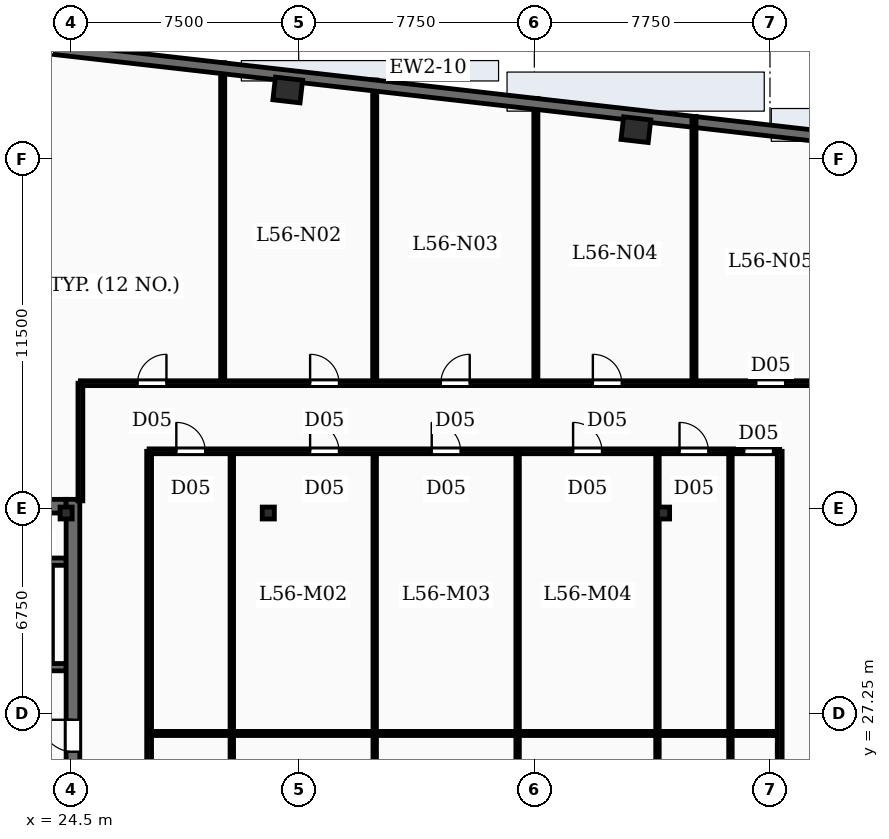
"""IFC4 building model, lengths in metres.
Left out: names, types, materials, properties, quantities, classifications, styles, units other than length and angle.
Written with IfcOpenShell. Run it as: python <this file> out.ifc"""

import sys

from ifc_helpers import new_model, si_unit, direction, frame, frame_2d, origin, origin_2d, place, context, subcontext, project, spatial, rectangle, i_section, extrude, element, fill, save


model = new_model("IFC4")
c1 = context("Model", 3, precision=1e-05, world=origin(), true_north=direction((0.0, 1.0)))
c2 = subcontext(c1, "Body", "Model", "MODEL_VIEW")
j1 = project(units=[si_unit("LENGTHUNIT", "METRE"), si_unit("PLANEANGLEUNIT", "RADIAN")], contexts=[c1])
p1 = place(None, origin())
s1 = spatial("IfcSite", under=j1, at=p1, CompositionType="ELEMENT")
p2 = place(p1, origin())
s2 = spatial("IfcBuilding", under=s1, at=p2, CompositionType="ELEMENT")
p3 = place(p2, frame((0.0, 0.0, 232.2)))
s3 = spatial("IfcBuildingStorey", under=s2, at=p3, CompositionType="ELEMENT", Elevation=232.2)
p4 = place(p3, frame((24.575, 19.0, -0.27), z_axis=(0.0, 0.0, 1.0), x_axis=(0.0, 1.0, 0.0)))
e1 = element("IfcWall", 1, at=p4, inside=s3, PredefinedType="SHEAR", context=c2, shape_type="SweptSolid", body=[
    extrude(rectangle(XDim=15.3, YDim=0.45, at=frame_2d((7.65, 0.0))), origin(), (0.0, 0.0, 1.0), 3.75),
])
p5 = place(p4, frame((2.5, 0.0, 0.27)))
e2 = element("IfcOpeningElement", 2, at=p5, cuts=e1, PredefinedType="OPENING", context=c2, shape_type="SweptSolid", body=[
    extrude(rectangle(XDim=1.05, YDim=2.15, at=frame_2d((0.525, 1.075))), frame((0.0, 0.235, 0.0), z_axis=(0.0, -1.0, 0.0), x_axis=(1.0, 0.0, 0.0)), (0.0, 0.0, 1.0), 0.47),
])
p6 = place(p4, frame((7.0, 0.0, 0.27)))
e3 = element("IfcOpeningElement", 3, at=p6, cuts=e1, PredefinedType="OPENING", context=c2, shape_type="SweptSolid", body=[
    extrude(rectangle(XDim=1.05, YDim=2.15, at=frame_2d((0.525, 1.075))), frame((0.0, 0.235, 0.0), z_axis=(0.0, -1.0, 0.0), x_axis=(1.0, 0.0, 0.0)), (0.0, 0.0, 1.0), 0.47),
])
p7 = place(p3, frame((14.55, 34.075, -0.27), z_axis=(0.0, 0.0, 1.0), x_axis=(1.0, 0.0, 0.0)))
e4 = element("IfcWall", 4, at=p7, inside=s3, PredefinedType="SHEAR", context=c2, shape_type="SweptSolid", body=[
    extrude(rectangle(XDim=9.8, YDim=0.45, at=frame_2d((4.9, 0.0))), origin(), (0.0, 0.0, 1.0), 3.75),
])
for number, where, z_axis, x_axis in (
    (5, (24.35, 33.85, -0.27), (0.0, 0.0, 1.0), (1.0, 0.0, 0.0)),
    (6, (31.0, 33.85, -0.27), (0.0, 0.0, 1.0), (1.0, 0.0, 0.0)),
    (7, (44.0, 33.85, -0.27), (0.0, 0.0, 1.0), (1.0, 0.0, 0.0)),
):
    element("IfcColumn", number, at=place(p3, frame(where, z_axis=z_axis, x_axis=x_axis)), inside=s3, PredefinedType="COLUMN", context=c2, shape_type="SweptSolid", body=[
        extrude(i_section(OverallWidth=0.399, OverallDepth=0.393, WebThickness=0.023, FlangeThickness=0.037, FilletRadius=0.02, at=origin_2d()), origin(), (0.0, 0.0, 1.0), 3.75),
    ])
for number, where, z_axis, x_axis in (
    (8, (43.091, 46.458, -0.27), (0.0, 0.0, 1.0), (0.994, -0.113, 0.0)),
    (9, (31.64, 47.763, -0.27), (0.0, 0.0, 1.0), (0.994, -0.113, 0.0)),
):
    element("IfcColumn", number, at=place(p3, frame(where, z_axis=z_axis, x_axis=x_axis)), inside=s3, PredefinedType="COLUMN", context=c2, shape_type="SweptSolid", body=[
        extrude(rectangle(XDim=0.9, YDim=0.75, at=origin_2d()), origin(), (0.0, 0.0, 1.0), 3.75),
    ])
p8 = place(p3, frame((19.894, 49.575, 0.0), z_axis=(0.0, 0.0, 1.0), x_axis=(0.993571439016, -0.113206870688, 0.0)))
e10 = element("IfcWall", 10, at=p8, inside=s3, PredefinedType="SOLIDWALL", context=c2, shape_type="SweptSolid", body=[
    extrude(rectangle(XDim=46.8, YDim=0.36, at=frame_2d((23.4, 0.0))), origin(), (0.0, 0.0, 1.0), 3.48),
])
p9 = place(p8, frame((2.6, 0.0, 0.88)))
e11 = element("IfcOpeningElement", 11, at=p9, cuts=e10, PredefinedType="OPENING", context=c2, shape_type="SweptSolid", body=[
    extrude(rectangle(XDim=1.5, YDim=2.05, at=frame_2d((0.75, 1.025))), frame((0.0, 0.19, 0.0), z_axis=(0.0, -1.0, 0.0), x_axis=(1.0, 0.0, 0.0)), (0.0, 0.0, 1.0), 0.38),
])
p10 = place(p8, frame((29.6, 0.0, 0.88)))
e12 = element("IfcOpeningElement", 12, at=p10, cuts=e10, PredefinedType="OPENING", context=c2, shape_type="SweptSolid", body=[
    extrude(rectangle(XDim=1.5, YDim=2.05, at=frame_2d((0.75, 1.025))), frame((0.0, 0.19, 0.0), z_axis=(0.0, -1.0, 0.0), x_axis=(1.0, 0.0, 0.0)), (0.0, 0.0, 1.0), 0.38),
])
p11 = place(p3, frame((24.35, 28.78, 0.0), z_axis=(0.0, 0.0, 1.0), x_axis=(-1.0, 0.0, 0.0)))
e13 = element("IfcWall", 13, at=p11, inside=s3, PredefinedType="SOLIDWALL", context=c2, shape_type="SweptSolid", body=[
    extrude(rectangle(XDim=9.8, YDim=0.24, at=frame_2d((4.9, 0.0))), origin(), (0.0, 0.0, 1.0), 3.48),
])
p12 = place(p11, frame((7.83, 0.0, 0.0)))
e14 = element("IfcOpeningElement", 14, at=p12, cuts=e13, PredefinedType="OPENING", context=c2, shape_type="SweptSolid", body=[
    extrude(rectangle(XDim=1.1, YDim=2.15, at=frame_2d((0.55, 1.075))), frame((0.0, 0.13, 0.0), z_axis=(0.0, -1.0, 0.0), x_axis=(1.0, 0.0, 0.0)), (0.0, 0.0, 1.0), 0.26),
])
p13 = place(p3, frame((14.55, 32.25, 0.0), z_axis=(0.0, 0.0, 1.0), x_axis=(1.0, 0.0, 0.0)))
e15 = element("IfcWall", 15, at=p13, inside=s3, PredefinedType="SOLIDWALL", context=c2, shape_type="SweptSolid", body=[
    extrude(rectangle(XDim=9.8, YDim=0.24, at=frame_2d((4.9, 0.0))), origin(), (0.0, 0.0, 1.0), 3.48),
])
p14 = place(p3, frame((23.78, 28.9, 0.0), z_axis=(0.0, 0.0, 1.0), x_axis=(0.0, 1.0, 0.0)))
e16 = element("IfcWall", 16, at=p14, inside=s3, PredefinedType="SOLIDWALL", context=c2, shape_type="SweptSolid", body=[
    extrude(rectangle(XDim=3.23, YDim=0.24, at=frame_2d((1.615, 0.0))), origin(), (0.0, 0.0, 1.0), 3.48),
])
p15 = place(p3, frame((29.5, 38.12, 0.0), z_axis=(0.0, 0.0, 1.0), x_axis=(0.0, 1.0, 0.0)))
e17 = element("IfcWall", 17, at=p15, inside=s3, PredefinedType="PARTITIONING", context=c2, shape_type="SweptSolid", body=[
    extrude(rectangle(XDim=10.541, YDim=0.135, at=frame_2d((5.271, 0.0))), origin(), (0.0, 0.0, 1.0), 2.54),
])
p16 = place(p3, frame((34.5, 38.12, 0.0), z_axis=(0.0, 0.0, 1.0), x_axis=(0.0, 1.0, 0.0)))
e18 = element("IfcWall", 18, at=p16, inside=s3, PredefinedType="PARTITIONING", context=c2, shape_type="SweptSolid", body=[
    extrude(rectangle(XDim=9.971, YDim=0.135, at=frame_2d((4.986, 0.0))), origin(), (0.0, 0.0, 1.0), 2.54),
])
p17 = place(p3, frame((39.8, 38.12, 0.0), z_axis=(0.0, 0.0, 1.0), x_axis=(0.0, 1.0, 0.0)))
e19 = element("IfcWall", 19, at=p17, inside=s3, PredefinedType="PARTITIONING", context=c2, shape_type="SweptSolid", body=[
    extrude(rectangle(XDim=9.368, YDim=0.135, at=frame_2d((4.684, 0.0))), origin(), (0.0, 0.0, 1.0), 2.54),
])
p18 = place(p3, frame((45.0, 38.12, 0.0), z_axis=(0.0, 0.0, 1.0), x_axis=(0.0, 1.0, 0.0)))
e20 = element("IfcWall", 20, at=p18, inside=s3, PredefinedType="PARTITIONING", context=c2, shape_type="SweptSolid", body=[
    extrude(rectangle(XDim=8.775, YDim=0.135, at=frame_2d((4.388, 0.0))), origin(), (0.0, 0.0, 1.0), 2.54),
])
p19 = place(p3, frame((24.82, 34.25, 0.0), z_axis=(0.0, 0.0, 1.0), x_axis=(0.0, 1.0, 0.0)))
e21 = element("IfcWall", 21, at=p19, inside=s3, PredefinedType="PARTITIONING", context=c2, shape_type="SweptSolid", body=[
    extrude(rectangle(XDim=3.87, YDim=0.16, at=frame_2d((1.935, 0.0))), origin(), (0.0, 0.0, 1.0), 2.54),
])
p20 = place(p3, frame((24.82, 38.12, 0.0), z_axis=(0.0, 0.0, 1.0), x_axis=(1.0, 0.0, 0.0)))
e22 = element("IfcWall", 22, at=p20, inside=s3, PredefinedType="PARTITIONING", context=c2, shape_type="SweptSolid", body=[
    extrude(rectangle(XDim=25.26, YDim=0.16, at=frame_2d((12.63, 0.0))), origin(), (0.0, 0.0, 1.0), 2.54),
])
p21 = place(p20, frame((1.88, 0.0, 0.0)))
e23 = element("IfcOpeningElement", 23, at=p21, cuts=e22, PredefinedType="OPENING", context=c2, shape_type="SweptSolid", body=[
    extrude(rectangle(XDim=0.95, YDim=2.15, at=frame_2d((0.475, 1.075))), frame((0.0, 0.09, 0.0), z_axis=(0.0, -1.0, 0.0), x_axis=(1.0, 0.0, 0.0)), (0.0, 0.0, 1.0), 0.18),
])
p22 = place(p20, frame((7.555, 0.0, 0.0)))
e24 = element("IfcOpeningElement", 24, at=p22, cuts=e22, PredefinedType="OPENING", context=c2, shape_type="SweptSolid", body=[
    extrude(rectangle(XDim=0.95, YDim=2.15, at=frame_2d((0.475, 1.075))), frame((0.0, 0.09, 0.0), z_axis=(0.0, -1.0, 0.0), x_axis=(1.0, 0.0, 0.0)), (0.0, 0.0, 1.0), 0.18),
])
p23 = place(p20, frame((11.855, 0.0, 0.0)))
e25 = element("IfcOpeningElement", 25, at=p23, cuts=e22, PredefinedType="OPENING", context=c2, shape_type="SweptSolid", body=[
    extrude(rectangle(XDim=0.95, YDim=2.15, at=frame_2d((0.475, 1.075))), frame((0.0, 0.09, 0.0), z_axis=(0.0, -1.0, 0.0), x_axis=(1.0, 0.0, 0.0)), (0.0, 0.0, 1.0), 0.18),
])
p24 = place(p20, frame((16.855, 0.0, 0.0)))
e26 = element("IfcOpeningElement", 26, at=p24, cuts=e22, PredefinedType="OPENING", context=c2, shape_type="SweptSolid", body=[
    extrude(rectangle(XDim=0.95, YDim=2.15, at=frame_2d((0.475, 1.075))), frame((0.0, 0.09, 0.0), z_axis=(0.0, -1.0, 0.0), x_axis=(1.0, 0.0, 0.0)), (0.0, 0.0, 1.0), 0.18),
])
p25 = place(p20, frame((22.23, 0.0, 0.0)))
e27 = element("IfcOpeningElement", 27, at=p25, cuts=e22, PredefinedType="OPENING", context=c2, shape_type="SweptSolid", body=[
    extrude(rectangle(XDim=0.95, YDim=2.15, at=frame_2d((0.475, 1.075))), frame((0.0, 0.09, 0.0), z_axis=(0.0, -1.0, 0.0), x_axis=(1.0, 0.0, 0.0)), (0.0, 0.0, 1.0), 0.18),
])
for number, where, z_axis, x_axis in (
    (28, (29.8, 15.38, 0.0), (0.0, 0.0, 1.0), (0.0, 1.0, 0.0)),
    (29, (34.5, 15.38, 0.0), (0.0, 0.0, 1.0), (0.0, 1.0, 0.0)),
    (30, (39.2, 15.38, 0.0), (0.0, 0.0, 1.0), (0.0, 1.0, 0.0)),
    (31, (43.8, 15.38, 0.0), (0.0, 0.0, 1.0), (0.0, 1.0, 0.0)),
    (32, (46.2, 15.38, 0.0), (0.0, 0.0, 1.0), (0.0, 1.0, 0.0)),
):
    element("IfcWall", number, at=place(p3, frame(where, z_axis=z_axis, x_axis=x_axis)), inside=s3, PredefinedType="PARTITIONING", context=c2, shape_type="SweptSolid", body=[
        extrude(rectangle(XDim=20.5, YDim=0.115, at=frame_2d((10.25, 0.0))), origin(), (0.0, 0.0, 1.0), 2.54),
    ])
p26 = place(p3, frame((27.08, 26.6, 0.0), z_axis=(0.0, 0.0, 1.0), x_axis=(1.0, 0.0, 0.0)))
e33 = element("IfcWall", 33, at=p26, inside=s3, PredefinedType="PARTITIONING", context=c2, shape_type="SweptSolid", body=[
    extrude(rectangle(XDim=20.74, YDim=0.135, at=frame_2d((10.37, 0.0))), origin(), (0.0, 0.0, 1.0), 2.54),
])
p27 = place(p3, frame((27.08, 35.88, 0.0), z_axis=(0.0, 0.0, 1.0), x_axis=(1.0, 0.0, 0.0)))
e34 = element("IfcWall", 34, at=p27, inside=s3, PredefinedType="PARTITIONING", context=c2, shape_type="SweptSolid", body=[
    extrude(rectangle(XDim=20.74, YDim=0.16, at=frame_2d((10.37, 0.0))), origin(), (0.0, 0.0, 1.0), 2.54),
])
p28 = place(p27, frame((0.895, 0.0, 0.0)))
e35 = element("IfcOpeningElement", 35, at=p28, cuts=e34, PredefinedType="OPENING", context=c2, shape_type="SweptSolid", body=[
    extrude(rectangle(XDim=0.95, YDim=2.15, at=frame_2d((0.475, 1.075))), frame((0.0, 0.09, 0.0), z_axis=(0.0, -1.0, 0.0), x_axis=(1.0, 0.0, 0.0)), (0.0, 0.0, 1.0), 0.18),
])
p29 = place(p27, frame((5.295, 0.0, 0.0)))
e36 = element("IfcOpeningElement", 36, at=p29, cuts=e34, PredefinedType="OPENING", context=c2, shape_type="SweptSolid", body=[
    extrude(rectangle(XDim=0.95, YDim=2.15, at=frame_2d((0.475, 1.075))), frame((0.0, 0.09, 0.0), z_axis=(0.0, -1.0, 0.0), x_axis=(1.0, 0.0, 0.0)), (0.0, 0.0, 1.0), 0.18),
])
p30 = place(p27, frame((9.295, 0.0, 0.0)))
e37 = element("IfcOpeningElement", 37, at=p30, cuts=e34, PredefinedType="OPENING", context=c2, shape_type="SweptSolid", body=[
    extrude(rectangle(XDim=0.95, YDim=2.15, at=frame_2d((0.475, 1.075))), frame((0.0, 0.09, 0.0), z_axis=(0.0, -1.0, 0.0), x_axis=(1.0, 0.0, 0.0)), (0.0, 0.0, 1.0), 0.18),
])
p31 = place(p27, frame((13.945, 0.0, 0.0)))
e38 = element("IfcOpeningElement", 38, at=p31, cuts=e34, PredefinedType="OPENING", context=c2, shape_type="SweptSolid", body=[
    extrude(rectangle(XDim=0.95, YDim=2.15, at=frame_2d((0.475, 1.075))), frame((0.0, 0.09, 0.0), z_axis=(0.0, -1.0, 0.0), x_axis=(1.0, 0.0, 0.0)), (0.0, 0.0, 1.0), 0.18),
])
p32 = place(p27, frame((17.445, 0.0, 0.0)))
e39 = element("IfcOpeningElement", 39, at=p32, cuts=e34, PredefinedType="OPENING", context=c2, shape_type="SweptSolid", body=[
    extrude(rectangle(XDim=0.95, YDim=2.15, at=frame_2d((0.475, 1.075))), frame((0.0, 0.09, 0.0), z_axis=(0.0, -1.0, 0.0), x_axis=(1.0, 0.0, 0.0)), (0.0, 0.0, 1.0), 0.18),
])
p33 = place(p27, frame((19.57, 0.0, 0.0)))
e40 = element("IfcOpeningElement", 40, at=p33, cuts=e34, PredefinedType="OPENING", context=c2, shape_type="SweptSolid", body=[
    extrude(rectangle(XDim=0.95, YDim=2.15, at=frame_2d((0.475, 1.075))), frame((0.0, 0.09, 0.0), z_axis=(0.0, -1.0, 0.0), x_axis=(1.0, 0.0, 0.0)), (0.0, 0.0, 1.0), 0.18),
])
for number, where, z_axis, x_axis in (
    (41, (27.08, 15.38, 0.0), (0.0, 0.0, 1.0), (0.0, 1.0, 0.0)),
    (42, (47.82, 15.38, 0.0), (0.0, 0.0, 1.0), (0.0, 1.0, 0.0)),
):
    element("IfcWall", number, at=place(p3, frame(where, z_axis=z_axis, x_axis=x_axis)), inside=s3, PredefinedType="PARTITIONING", context=c2, shape_type="SweptSolid", body=[
        extrude(rectangle(XDim=20.5, YDim=0.16, at=frame_2d((10.25, 0.0))), origin(), (0.0, 0.0, 1.0), 2.54),
    ])
p34 = place(p6, origin())
e43 = element("IfcDoor", 43, at=p34, inside=s3, OperationType="SINGLE_SWING_RIGHT", PredefinedType="DOOR", context=c2, shape_type="SweptSolid", body=[
    extrude(rectangle(XDim=1.05, YDim=2.15, at=frame_2d((0.525, 1.075))), frame((0.0, 0.025, 0.0), z_axis=(0.0, -1.0, 0.0), x_axis=(1.0, 0.0, 0.0)), (0.0, 0.0, 1.0), 0.05),
])
fill(e3, e43)
p35 = place(p21, origin())
e44 = element("IfcDoor", 44, at=p35, inside=s3, OperationType="SINGLE_SWING_RIGHT", PredefinedType="DOOR", context=c2, shape_type="SweptSolid", body=[
    extrude(rectangle(XDim=0.95, YDim=2.15, at=frame_2d((0.475, 1.075))), frame((0.0, 0.025, 0.0), z_axis=(0.0, -1.0, 0.0), x_axis=(1.0, 0.0, 0.0)), (0.0, 0.0, 1.0), 0.05),
])
fill(e23, e44)
p36 = place(p22, origin())
e45 = element("IfcDoor", 45, at=p36, inside=s3, OperationType="SINGLE_SWING_LEFT", PredefinedType="DOOR", context=c2, shape_type="SweptSolid", body=[
    extrude(rectangle(XDim=0.95, YDim=2.15, at=frame_2d((0.475, 1.075))), frame((0.0, 0.025, 0.0), z_axis=(0.0, -1.0, 0.0), x_axis=(1.0, 0.0, 0.0)), (0.0, 0.0, 1.0), 0.05),
])
fill(e24, e45)
p37 = place(p23, origin())
e46 = element("IfcDoor", 46, at=p37, inside=s3, OperationType="SINGLE_SWING_RIGHT", PredefinedType="DOOR", context=c2, shape_type="SweptSolid", body=[
    extrude(rectangle(XDim=0.95, YDim=2.15, at=frame_2d((0.475, 1.075))), frame((0.0, 0.025, 0.0), z_axis=(0.0, -1.0, 0.0), x_axis=(1.0, 0.0, 0.0)), (0.0, 0.0, 1.0), 0.05),
])
fill(e25, e46)
p38 = place(p24, origin())
e47 = element("IfcDoor", 47, at=p38, inside=s3, OperationType="SINGLE_SWING_LEFT", PredefinedType="DOOR", context=c2, shape_type="SweptSolid", body=[
    extrude(rectangle(XDim=0.95, YDim=2.15, at=frame_2d((0.475, 1.075))), frame((0.0, 0.025, 0.0), z_axis=(0.0, -1.0, 0.0), x_axis=(1.0, 0.0, 0.0)), (0.0, 0.0, 1.0), 0.05),
])
fill(e26, e47)
p39 = place(p25, origin())
e48 = element("IfcDoor", 48, at=p39, inside=s3, OperationType="SINGLE_SWING_RIGHT", PredefinedType="DOOR", context=c2, shape_type="SweptSolid", body=[
    extrude(rectangle(XDim=0.95, YDim=2.15, at=frame_2d((0.475, 1.075))), frame((0.0, 0.025, 0.0), z_axis=(0.0, -1.0, 0.0), x_axis=(1.0, 0.0, 0.0)), (0.0, 0.0, 1.0), 0.05),
])
fill(e27, e48)
p40 = place(p28, origin())
e49 = element("IfcDoor", 49, at=p40, inside=s3, OperationType="SINGLE_SWING_LEFT", PredefinedType="DOOR", context=c2, shape_type="SweptSolid", body=[
    extrude(rectangle(XDim=0.95, YDim=2.15, at=frame_2d((0.475, 1.075))), frame((0.0, 0.025, 0.0), z_axis=(0.0, -1.0, 0.0), x_axis=(1.0, 0.0, 0.0)), (0.0, 0.0, 1.0), 0.05),
])
fill(e35, e49)
p41 = place(p29, origin())
e50 = element("IfcDoor", 50, at=p41, inside=s3, OperationType="SINGLE_SWING_LEFT", PredefinedType="DOOR", context=c2, shape_type="SweptSolid", body=[
    extrude(rectangle(XDim=0.95, YDim=2.15, at=frame_2d((0.475, 1.075))), frame((0.0, 0.025, 0.0), z_axis=(0.0, -1.0, 0.0), x_axis=(1.0, 0.0, 0.0)), (0.0, 0.0, 1.0), 0.05),
])
fill(e36, e50)
p42 = place(p30, origin())
e51 = element("IfcDoor", 51, at=p42, inside=s3, OperationType="SINGLE_SWING_LEFT", PredefinedType="DOOR", context=c2, shape_type="SweptSolid", body=[
    extrude(rectangle(XDim=0.95, YDim=2.15, at=frame_2d((0.475, 1.075))), frame((0.0, 0.025, 0.0), z_axis=(0.0, -1.0, 0.0), x_axis=(1.0, 0.0, 0.0)), (0.0, 0.0, 1.0), 0.05),
])
fill(e37, e51)
p43 = place(p31, origin())
e52 = element("IfcDoor", 52, at=p43, inside=s3, OperationType="SINGLE_SWING_LEFT", PredefinedType="DOOR", context=c2, shape_type="SweptSolid", body=[
    extrude(rectangle(XDim=0.95, YDim=2.15, at=frame_2d((0.475, 1.075))), frame((0.0, 0.025, 0.0), z_axis=(0.0, -1.0, 0.0), x_axis=(1.0, 0.0, 0.0)), (0.0, 0.0, 1.0), 0.05),
])
fill(e38, e52)
p44 = place(p32, origin())
e53 = element("IfcDoor", 53, at=p44, inside=s3, OperationType="SINGLE_SWING_LEFT", PredefinedType="DOOR", context=c2, shape_type="SweptSolid", body=[
    extrude(rectangle(XDim=0.95, YDim=2.15, at=frame_2d((0.475, 1.075))), frame((0.0, 0.025, 0.0), z_axis=(0.0, -1.0, 0.0), x_axis=(1.0, 0.0, 0.0)), (0.0, 0.0, 1.0), 0.05),
])
fill(e39, e53)
p45 = place(p33, origin())
e54 = element("IfcDoor", 54, at=p45, inside=s3, OperationType="SINGLE_SWING_LEFT", PredefinedType="DOOR", context=c2, shape_type="SweptSolid", body=[
    extrude(rectangle(XDim=0.95, YDim=2.15, at=frame_2d((0.475, 1.075))), frame((0.0, 0.025, 0.0), z_axis=(0.0, -1.0, 0.0), x_axis=(1.0, 0.0, 0.0)), (0.0, 0.0, 1.0), 0.05),
])
fill(e40, e54)
save(model, sys.argv[1])
